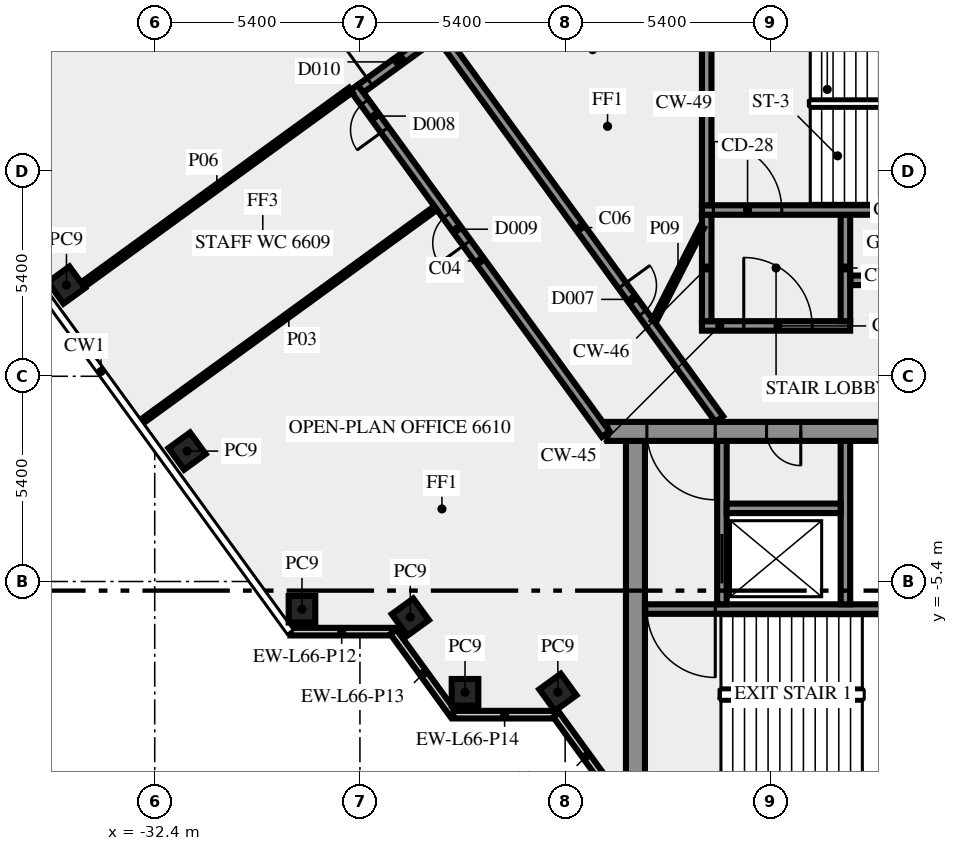
"""IFC4 building model, lengths in metres.
Left out: names, types, materials, properties, quantities, classifications, styles, units other than length and angle.
Written with IfcOpenShell. Run it as: python <this file> out.ifc"""

import sys

from ifc_helpers import new_model, si_unit, direction, frame, frame_2d, origin, origin_2d, place, context, subcontext, project, spatial, rectangle, extrude, element, fill, save


model = new_model("IFC4")
c1 = context("Model", 3, precision=1e-05, world=origin(), true_north=direction((0.0, 1.0)))
c2 = subcontext(c1, "Body", "Model", "MODEL_VIEW")
j1 = project(units=[si_unit("LENGTHUNIT", "METRE"), si_unit("PLANEANGLEUNIT", "RADIAN")], contexts=[c1])
p1 = place(None, origin())
s1 = spatial("IfcSite", under=j1, at=p1, CompositionType="ELEMENT")
p2 = place(p1, origin())
s2 = spatial("IfcBuilding", under=s1, at=p2, CompositionType="ELEMENT")
p3 = place(p2, frame((0.0, 0.0, 285.0)))
s3 = spatial("IfcBuildingStorey", under=s2, at=p3, CompositionType="ELEMENT", Elevation=285.0)
for number, where, z_axis, x_axis in (
    (1, (-34.722, 2.4, 0.0), (0.0, 0.0, 1.0), (0.588, -0.809, 0.0)),
    (2, (-31.548, -1.969, 0.0), (0.0, 0.0, 1.0), (0.588, -0.809, 0.0)),
    (3, (-28.525, -6.13, 0.0), (0.0, 0.0, 1.0), (1.0, 0.0, 0.0)),
    (4, (-25.674, -6.337, 0.0), (0.0, 0.0, 1.0), (0.588, -0.809, 0.0)),
    (5, (-24.235, -8.315, 0.0), (0.0, 0.0, 1.0), (1.0, 0.0, 0.0)),
    (6, (-21.792, -8.315, 0.0), (0.0, 0.0, 1.0), (0.588, -0.809, 0.0)),
):
    element("IfcColumn", number, at=place(p3, frame(where, z_axis=z_axis, x_axis=x_axis)), inside=s3, PredefinedType="COLUMN", context=c2, shape_type="SweptSolid", body=[
        extrude(rectangle(XDim=0.7, YDim=0.7, at=origin_2d()), origin(), (0.0, 0.0, 1.0), 3.65),
    ])
p4 = place(p3, frame((-28.83, -6.719, 0.0), z_axis=(0.0, 0.0, 1.0), x_axis=(1.0, 0.0, 0.0)))
e7 = element("IfcWall", 7, at=p4, inside=s3, PredefinedType="SOLIDWALL", context=c2, shape_type="SweptSolid", body=[
    extrude(rectangle(XDim=2.7, YDim=0.2, at=frame_2d((1.35, 0.0))), origin(), (0.0, 0.0, 1.0), 3.65),
])
p5 = place(p3, frame((-26.12, -6.724, 0.0), z_axis=(0.0, 0.0, 1.0), x_axis=(0.587720002413, -0.809064397168, 0.0)))
e8 = element("IfcWall", 8, at=p5, inside=s3, PredefinedType="SOLIDWALL", context=c2, shape_type="SweptSolid", body=[
    extrude(rectangle(XDim=2.7, YDim=0.2, at=frame_2d((1.35, 0.0))), origin(), (0.0, 0.0, 1.0), 3.65),
])
p6 = place(p3, frame((-24.543, -8.904, 0.0), z_axis=(0.0, 0.0, 1.0), x_axis=(1.0, 0.0, 0.0)))
e9 = element("IfcWall", 9, at=p6, inside=s3, PredefinedType="SOLIDWALL", context=c2, shape_type="SweptSolid", body=[
    extrude(rectangle(XDim=2.7, YDim=0.2, at=frame_2d((1.35, 0.0))), origin(), (0.0, 0.0, 1.0), 3.65),
])
p7 = place(p3, frame((-21.833, -8.909, 0.0), z_axis=(0.0, 0.0, 1.0), x_axis=(0.587766567315, -0.809030569476, 0.0)))
e10 = element("IfcWall", 10, at=p7, inside=s3, PredefinedType="SOLIDWALL", context=c2, shape_type="SweptSolid", body=[
    extrude(rectangle(XDim=2.688, YDim=0.2, at=frame_2d((1.344, 0.0))), origin(), (0.0, 0.0, 1.0), 3.65),
])
p8 = place(p3, frame((-19.75, -10.5, 0.0), z_axis=(0.0, 0.0, 1.0), x_axis=(0.0, 1.0, 0.0)))
e11 = element("IfcWall", 11, at=p8, inside=s3, PredefinedType="SHEAR", context=c2, shape_type="SweptSolid", body=[
    extrude(rectangle(XDim=8.8, YDim=0.5, at=frame_2d((4.4, 0.0))), origin(), (0.0, 0.0, 1.0), 3.65),
])
p9 = place(p3, frame((-11.45, -6.125, 0.0), z_axis=(0.0, 0.0, 1.0), x_axis=(-1.0, 0.0, 0.0)))
e12 = element("IfcWall", 12, at=p9, inside=s3, PredefinedType="SHEAR", context=c2, shape_type="SweptSolid", body=[
    extrude(rectangle(XDim=8.05, YDim=0.25, at=frame_2d((4.025, 0.0))), origin(), (0.0, 0.0, 1.0), 3.65),
])
p10 = place(p9, frame((6.2, 0.0, 0.0)))
e13 = element("IfcOpeningElement", 13, at=p10, cuts=e12, PredefinedType="OPENING", context=c2, shape_type="SweptSolid", body=[
    extrude(rectangle(XDim=1.8, YDim=2.1, at=frame_2d((0.9, 1.05))), frame((0.0, 0.135, 0.0), z_axis=(0.0, -1.0, 0.0), x_axis=(1.0, 0.0, 0.0)), (0.0, 0.0, 1.0), 0.27),
])
p11 = place(p3, frame((-17.475, -6.0, 0.0), z_axis=(0.0, 0.0, 1.0), x_axis=(0.0, 1.0, 0.0)))
e14 = element("IfcWall", 14, at=p11, inside=s3, PredefinedType="SHEAR", context=c2, shape_type="SweptSolid", body=[
    extrude(rectangle(XDim=4.3, YDim=0.25, at=frame_2d((2.15, 0.0))), origin(), (0.0, 0.0, 1.0), 3.65),
])
p12 = place(p11, frame((0.55, 0.0, 0.0)))
e15 = element("IfcOpeningElement", 15, at=p12, cuts=e14, PredefinedType="OPENING", context=c2, shape_type="SweptSolid", body=[
    extrude(rectangle(XDim=1.3, YDim=2.1, at=frame_2d((0.65, 1.05))), frame((0.0, 0.135, 0.0), z_axis=(0.0, -1.0, 0.0), x_axis=(1.0, 0.0, 0.0)), (0.0, 0.0, 1.0), 0.27),
])
p13 = place(p3, frame((-14.225, -6.0, 0.0), z_axis=(0.0, 0.0, 1.0), x_axis=(0.0, 1.0, 0.0)))
e16 = element("IfcWall", 16, at=p13, inside=s3, PredefinedType="SHEAR", context=c2, shape_type="SweptSolid", body=[
    extrude(rectangle(XDim=4.3, YDim=0.25, at=frame_2d((2.15, 0.0))), origin(), (0.0, 0.0, 1.0), 3.65),
])
p14 = place(p3, frame((-17.35, -3.475, 0.0), z_axis=(0.0, 0.0, 1.0), x_axis=(1.0, 0.0, 0.0)))
e17 = element("IfcWall", 17, at=p14, inside=s3, PredefinedType="SHEAR", context=c2, shape_type="SweptSolid", body=[
    extrude(rectangle(XDim=3.0, YDim=0.25, at=frame_2d((1.5, 0.0))), origin(), (0.0, 0.0, 1.0), 3.65),
])
p15 = place(p3, frame((20.49, -1.45, 0.0), z_axis=(0.0, 0.0, 1.0), x_axis=(-1.0, 0.0, 0.0)))
e18 = element("IfcWall", 18, at=p15, inside=s3, PredefinedType="SHEAR", context=c2, shape_type="SweptSolid", body=[
    extrude(rectangle(XDim=40.98, YDim=0.5, at=frame_2d((20.49, 0.0))), origin(), (0.0, 0.0, 1.0), 3.65),
])
p16 = place(p15, frame((38.14, 0.0, 0.0)))
e19 = element("IfcOpeningElement", 19, at=p16, cuts=e18, PredefinedType="OPENING", context=c2, shape_type="SweptSolid", body=[
    extrude(rectangle(XDim=1.8, YDim=2.1, at=frame_2d((0.9, 1.05))), frame((0.0, 0.26, 0.0), z_axis=(0.0, -1.0, 0.0), x_axis=(1.0, 0.0, 0.0)), (0.0, 0.0, 1.0), 0.52),
])
p17 = place(p15, frame((35.89, 0.0, 0.0)))
e20 = element("IfcOpeningElement", 20, at=p17, cuts=e18, PredefinedType="OPENING", context=c2, shape_type="SweptSolid", body=[
    extrude(rectangle(XDim=0.9, YDim=2.1, at=frame_2d((0.45, 1.05))), frame((0.0, 0.26, 0.0), z_axis=(0.0, -1.0, 0.0), x_axis=(1.0, 0.0, 0.0)), (0.0, 0.0, 1.0), 0.52),
])
p18 = place(p15, frame((32.94, 0.0, 0.0)))
e21 = element("IfcOpeningElement", 21, at=p18, cuts=e18, PredefinedType="OPENING", context=c2, shape_type="SweptSolid", body=[
    extrude(rectangle(XDim=0.9, YDim=2.1, at=frame_2d((0.45, 1.05))), frame((0.0, 0.26, 0.0), z_axis=(0.0, -1.0, 0.0), x_axis=(1.0, 0.0, 0.0)), (0.0, 0.0, 1.0), 0.52),
])
p19 = place(p15, frame((31.015, 0.0, 0.0)))
e22 = element("IfcOpeningElement", 22, at=p19, cuts=e18, PredefinedType="OPENING", context=c2, shape_type="SweptSolid", body=[
    extrude(rectangle(XDim=0.8, YDim=2.1, at=frame_2d((0.4, 1.05))), frame((0.0, 0.26, 0.0), z_axis=(0.0, -1.0, 0.0), x_axis=(1.0, 0.0, 0.0)), (0.0, 0.0, 1.0), 0.52),
])
p20 = place(p15, frame((24.765, 0.0, 0.0)))
e23 = element("IfcOpeningElement", 23, at=p20, cuts=e18, PredefinedType="OPENING", context=c2, shape_type="SweptSolid", body=[
    extrude(rectangle(XDim=0.8, YDim=2.1, at=frame_2d((0.4, 1.05))), frame((0.0, 0.26, 0.0), z_axis=(0.0, -1.0, 0.0), x_axis=(1.0, 0.0, 0.0)), (0.0, 0.0, 1.0), 0.52),
])
p21 = place(p15, frame((21.765, 0.0, 0.0)))
e24 = element("IfcOpeningElement", 24, at=p21, cuts=e18, PredefinedType="OPENING", context=c2, shape_type="SweptSolid", body=[
    extrude(rectangle(XDim=2.0, YDim=2.1, at=frame_2d((1.0, 1.05))), frame((0.0, 0.26, 0.0), z_axis=(0.0, -1.0, 0.0), x_axis=(1.0, 0.0, 0.0)), (0.0, 0.0, 1.0), 0.52),
])
p22 = place(p15, frame((15.202, 0.0, 0.0)))
e25 = element("IfcOpeningElement", 25, at=p22, cuts=e18, PredefinedType="OPENING", context=c2, shape_type="SweptSolid", body=[
    extrude(rectangle(XDim=0.9, YDim=2.1, at=frame_2d((0.45, 1.05))), frame((0.0, 0.26, 0.0), z_axis=(0.0, -1.0, 0.0), x_axis=(1.0, 0.0, 0.0)), (0.0, 0.0, 1.0), 0.52),
])
p23 = place(p15, frame((13.54, 0.0, 0.0)))
e26 = element("IfcOpeningElement", 26, at=p23, cuts=e18, PredefinedType="OPENING", context=c2, shape_type="SweptSolid", body=[
    extrude(rectangle(XDim=0.9, YDim=2.1, at=frame_2d((0.45, 1.05))), frame((0.0, 0.26, 0.0), z_axis=(0.0, -1.0, 0.0), x_axis=(1.0, 0.0, 0.0)), (0.0, 0.0, 1.0), 0.52),
])
p24 = place(p15, frame((11.64, 0.0, 0.0)))
e27 = element("IfcOpeningElement", 27, at=p24, cuts=e18, PredefinedType="OPENING", context=c2, shape_type="SweptSolid", body=[
    extrude(rectangle(XDim=0.9, YDim=2.1, at=frame_2d((0.45, 1.05))), frame((0.0, 0.26, 0.0), z_axis=(0.0, -1.0, 0.0), x_axis=(1.0, 0.0, 0.0)), (0.0, 0.0, 1.0), 0.52),
])
p25 = place(p15, frame((9.577, 0.0, 0.0)))
e28 = element("IfcOpeningElement", 28, at=p25, cuts=e18, PredefinedType="OPENING", context=c2, shape_type="SweptSolid", body=[
    extrude(rectangle(XDim=0.9, YDim=2.1, at=frame_2d((0.45, 1.05))), frame((0.0, 0.26, 0.0), z_axis=(0.0, -1.0, 0.0), x_axis=(1.0, 0.0, 0.0)), (0.0, 0.0, 1.0), 0.52),
])
p26 = place(p15, frame((7.14, 0.0, 0.0)))
e29 = element("IfcOpeningElement", 29, at=p26, cuts=e18, PredefinedType="OPENING", context=c2, shape_type="SweptSolid", body=[
    extrude(rectangle(XDim=0.9, YDim=2.1, at=frame_2d((0.45, 1.05))), frame((0.0, 0.26, 0.0), z_axis=(0.0, -1.0, 0.0), x_axis=(1.0, 0.0, 0.0)), (0.0, 0.0, 1.0), 0.52),
])
p27 = place(p15, frame((5.028, 0.0, 0.0)))
e30 = element("IfcOpeningElement", 30, at=p27, cuts=e18, PredefinedType="OPENING", context=c2, shape_type="SweptSolid", body=[
    extrude(rectangle(XDim=0.8, YDim=2.1, at=frame_2d((0.4, 1.05))), frame((0.0, 0.26, 0.0), z_axis=(0.0, -1.0, 0.0), x_axis=(1.0, 0.0, 0.0)), (0.0, 0.0, 1.0), 0.52),
])
p28 = place(p15, frame((3.452, 0.0, 0.0)))
e31 = element("IfcOpeningElement", 31, at=p28, cuts=e18, PredefinedType="OPENING", context=c2, shape_type="SweptSolid", body=[
    extrude(rectangle(XDim=0.8, YDim=2.1, at=frame_2d((0.4, 1.05))), frame((0.0, 0.26, 0.0), z_axis=(0.0, -1.0, 0.0), x_axis=(1.0, 0.0, 0.0)), (0.0, 0.0, 1.0), 0.52),
])
p29 = place(p15, frame((1.04, 0.0, 0.0)))
e32 = element("IfcOpeningElement", 32, at=p29, cuts=e18, PredefinedType="OPENING", context=c2, shape_type="SweptSolid", body=[
    extrude(rectangle(XDim=1.8, YDim=2.1, at=frame_2d((0.9, 1.05))), frame((0.0, 0.26, 0.0), z_axis=(0.0, -1.0, 0.0), x_axis=(1.0, 0.0, 0.0)), (0.0, 0.0, 1.0), 0.52),
])
p30 = place(p3, frame((-18.0, 1.325, 0.0), z_axis=(0.0, 0.0, 1.0), x_axis=(1.0, 0.0, 0.0)))
e33 = element("IfcWall", 33, at=p30, inside=s3, PredefinedType="SHEAR", context=c2, shape_type="SweptSolid", body=[
    extrude(rectangle(XDim=3.9, YDim=0.25, at=frame_2d((1.95, 0.0))), origin(), (0.0, 0.0, 1.0), 3.65),
])
p31 = place(p30, frame((1.1, 0.0, 0.0)))
e34 = element("IfcOpeningElement", 34, at=p31, cuts=e33, PredefinedType="OPENING", context=c2, shape_type="SweptSolid", body=[
    extrude(rectangle(XDim=1.8, YDim=2.1, at=frame_2d((0.9, 1.05))), frame((0.0, 0.135, 0.0), z_axis=(0.0, -1.0, 0.0), x_axis=(1.0, 0.0, 0.0)), (0.0, 0.0, 1.0), 0.27),
])
for number, where, z_axis, x_axis in (
    (35, (-17.875, 1.45, 0.0), (0.0, 0.0, 1.0), (0.0, 1.0, 0.0)),
    (36, (-14.225, 1.45, 0.0), (0.0, 0.0, 1.0), (0.0, 1.0, 0.0)),
):
    element("IfcWall", number, at=place(p3, frame(where, z_axis=z_axis, x_axis=x_axis)), inside=s3, PredefinedType="SHEAR", context=c2, shape_type="SweptSolid", body=[
        extrude(rectangle(XDim=2.8, YDim=0.25, at=frame_2d((1.4, 0.0))), origin(), (0.0, 0.0, 1.0), 3.65),
    ])
p32 = place(p3, frame((-18.0, 4.375, 0.0), z_axis=(0.0, 0.0, 1.0), x_axis=(1.0, 0.0, 0.0)))
e37 = element("IfcWall", 37, at=p32, inside=s3, PredefinedType="SHEAR", context=c2, shape_type="SweptSolid", body=[
    extrude(rectangle(XDim=10.5, YDim=0.25, at=frame_2d((5.25, 0.0))), origin(), (0.0, 0.0, 1.0), 3.65),
])
p33 = place(p32, frame((0.3, 0.0, 0.0)))
e38 = element("IfcOpeningElement", 38, at=p33, cuts=e37, PredefinedType="OPENING", context=c2, shape_type="SweptSolid", body=[
    extrude(rectangle(XDim=1.8, YDim=2.1, at=frame_2d((0.9, 1.05))), frame((0.0, 0.135, 0.0), z_axis=(0.0, -1.0, 0.0), x_axis=(1.0, 0.0, 0.0)), (0.0, 0.0, 1.0), 0.27),
])
p34 = place(p3, frame((-17.875, 4.5, 0.0), z_axis=(0.0, 0.0, 1.0), x_axis=(0.0, 1.0, 0.0)))
e39 = element("IfcWall", 39, at=p34, inside=s3, PredefinedType="SHEAR", context=c2, shape_type="SweptSolid", body=[
    extrude(rectangle(XDim=5.35, YDim=0.25, at=frame_2d((2.675, 0.0))), origin(), (0.0, 0.0, 1.0), 3.65),
])
p35 = place(p3, frame((-20.531, -1.523, 0.0), z_axis=(0.0, 0.0, 1.0), x_axis=(-0.587782646447, 0.809018887626, 0.0)))
e40 = element("IfcWall", 40, at=p35, inside=s3, PredefinedType="SOLIDWALL", context=c2, shape_type="SweptSolid", body=[
    extrude(rectangle(XDim=11.27, YDim=0.25, at=frame_2d((5.635, 0.0))), origin(), (0.0, 0.0, 1.0), 3.65),
])
p36 = place(p35, frame((6.216, 0.0, 0.0)))
e41 = element("IfcOpeningElement", 41, at=p36, cuts=e40, PredefinedType="OPENING", context=c2, shape_type="SweptSolid", body=[
    extrude(rectangle(XDim=0.9, YDim=2.1, at=frame_2d((0.45, 1.05))), frame((0.0, 0.135, 0.0), z_axis=(0.0, -1.0, 0.0), x_axis=(1.0, 0.0, 0.0)), (0.0, 0.0, 1.0), 0.27),
])
p37 = place(p35, frame((9.896, 0.0, 0.0)))
e42 = element("IfcOpeningElement", 42, at=p37, cuts=e40, PredefinedType="OPENING", context=c2, shape_type="SweptSolid", body=[
    extrude(rectangle(XDim=0.9, YDim=2.1, at=frame_2d((0.45, 1.05))), frame((0.0, 0.135, 0.0), z_axis=(0.0, -1.0, 0.0), x_axis=(1.0, 0.0, 0.0)), (0.0, 0.0, 1.0), 0.27),
])
p38 = place(p3, frame((-26.981, 7.567, 0.0), z_axis=(0.0, 0.0, 1.0), x_axis=(0.809038743598, 0.587755315891, 0.0)))
e43 = element("IfcWall", 43, at=p38, inside=s3, PredefinedType="SOLIDWALL", context=c2, shape_type="SweptSolid", body=[
    extrude(rectangle(XDim=2.65, YDim=0.25, at=frame_2d((1.325, 0.0))), origin(), (0.0, 0.0, 1.0), 3.65),
])
p39 = place(p38, frame((0.3, 0.0, 0.0)))
e44 = element("IfcOpeningElement", 44, at=p39, cuts=e43, PredefinedType="OPENING", context=c2, shape_type="SweptSolid", body=[
    extrude(rectangle(XDim=1.8, YDim=2.1, at=frame_2d((0.9, 1.05))), frame((0.0, 0.135, 0.0), z_axis=(0.0, -1.0, 0.0), x_axis=(1.0, 0.0, 0.0)), (0.0, 0.0, 1.0), 0.27),
])
p40 = place(p3, frame((-24.865, 8.95, 0.0), z_axis=(0.0, 0.0, 1.0), x_axis=(0.587791617212, -0.809012369952, 0.0)))
e45 = element("IfcWall", 45, at=p40, inside=s3, PredefinedType="SOLIDWALL", context=c2, shape_type="SweptSolid", body=[
    extrude(rectangle(XDim=12.453, YDim=0.25, at=frame_2d((6.227, 0.0))), origin(), (0.0, 0.0, 1.0), 3.65),
])
p41 = place(p40, frame((8.112, 0.0, 0.0)))
e46 = element("IfcOpeningElement", 46, at=p41, cuts=e45, PredefinedType="OPENING", context=c2, shape_type="SweptSolid", body=[
    extrude(rectangle(XDim=0.9, YDim=2.1, at=frame_2d((0.45, 1.05))), frame((0.0, 0.135, 0.0), z_axis=(0.0, -1.0, 0.0), x_axis=(1.0, 0.0, 0.0)), (0.0, 0.0, 1.0), 0.27),
])
p42 = place(p3, frame((-14.09, 2.525, 0.0), z_axis=(0.0, 0.0, 1.0), x_axis=(1.0, 0.0, 0.0)))
e47 = element("IfcWall", 47, at=p42, inside=s3, PredefinedType="SOLIDWALL", context=c2, shape_type="SweptSolid", body=[
    extrude(rectangle(XDim=8.84, YDim=0.25, at=frame_2d((4.42, 0.0))), origin(), (0.0, 0.0, 1.0), 3.65),
])
p43 = place(p42, frame((3.453, 0.0, 0.0)))
e48 = element("IfcOpeningElement", 48, at=p43, cuts=e47, PredefinedType="OPENING", context=c2, shape_type="SweptSolid", body=[
    extrude(rectangle(XDim=1.8, YDim=2.1, at=frame_2d((0.9, 1.05))), frame((0.0, 0.135, 0.0), z_axis=(0.0, -1.0, 0.0), x_axis=(1.0, 0.0, 0.0)), (0.0, 0.0, 1.0), 0.27),
])
p44 = place(p3, frame((-25.008, 4.427, 0.0), z_axis=(0.0, 0.0, 1.0), x_axis=(-0.808994684961, -0.587815957341, 0.0)))
e49 = element("IfcWall", 49, at=p44, inside=s3, PredefinedType="PARTITIONING", context=c2, shape_type="SweptSolid", body=[
    extrude(rectangle(XDim=9.55, YDim=0.12, at=frame_2d((4.775, 0.0))), origin(), (0.0, 0.0, 1.0), 2.95),
])
p45 = place(p3, frame((-34.291, 2.41, 0.0), z_axis=(0.0, 0.0, 1.0), x_axis=(0.809027940177, 0.587770186393, 0.0)))
e50 = element("IfcWall", 50, at=p45, inside=s3, PredefinedType="PARTITIONING", context=c2, shape_type="SweptSolid", body=[
    extrude(rectangle(XDim=8.715, YDim=0.15, at=frame_2d((4.357, 0.0))), origin(), (0.0, 0.0, 1.0), 3.65),
])
p46 = place(p3, frame((-19.261, 1.45, 0.0), z_axis=(0.0, 0.0, 1.0), x_axis=(0.453950796792, 0.891026752736, 0.0)))
e51 = element("IfcWall", 51, at=p46, inside=s3, PredefinedType="PARTITIONING", context=c2, shape_type="SweptSolid", body=[
    extrude(rectangle(XDim=2.778, YDim=0.12, at=frame_2d((1.389, 0.0))), origin(), (0.0, 0.0, 1.0), 3.65),
])
p47 = place(p10, origin())
e52 = element("IfcDoor", 52, at=p47, inside=s3, OperationType="DOUBLE_DOOR_SINGLE_SWING", PredefinedType="DOOR", context=c2, shape_type="SweptSolid", body=[
    extrude(rectangle(XDim=1.8, YDim=2.1, at=frame_2d((0.9, 1.05))), frame((0.0, 0.025, 0.0), z_axis=(0.0, -1.0, 0.0), x_axis=(1.0, 0.0, 0.0)), (0.0, 0.0, 1.0), 0.05),
])
fill(e13, e52)
p48 = place(p12, origin())
e53 = element("IfcDoor", 53, at=p48, inside=s3, OperationType="DOUBLE_DOOR_SLIDING", PredefinedType="DOOR", context=c2, shape_type="SweptSolid", body=[
    extrude(rectangle(XDim=1.3, YDim=2.1, at=frame_2d((0.65, 1.05))), frame((0.0, 0.025, 0.0), z_axis=(0.0, -1.0, 0.0), x_axis=(1.0, 0.0, 0.0)), (0.0, 0.0, 1.0), 0.05),
])
fill(e15, e53)
p49 = place(p16, origin())
e54 = element("IfcDoor", 54, at=p49, inside=s3, OperationType="DOUBLE_DOOR_SINGLE_SWING", PredefinedType="DOOR", context=c2, shape_type="SweptSolid", body=[
    extrude(rectangle(XDim=1.8, YDim=2.1, at=frame_2d((0.9, 1.05))), frame((0.0, 0.025, 0.0), z_axis=(0.0, -1.0, 0.0), x_axis=(1.0, 0.0, 0.0)), (0.0, 0.0, 1.0), 0.05),
])
fill(e19, e54)
p50 = place(p17, origin())
e55 = element("IfcDoor", 55, at=p50, inside=s3, OperationType="SINGLE_SWING_RIGHT", PredefinedType="DOOR", context=c2, shape_type="SweptSolid", body=[
    extrude(rectangle(XDim=0.9, YDim=2.1, at=frame_2d((0.45, 1.05))), frame((0.0, 0.025, 0.0), z_axis=(0.0, -1.0, 0.0), x_axis=(1.0, 0.0, 0.0)), (0.0, 0.0, 1.0), 0.05),
])
fill(e20, e55)
p51 = place(p31, origin())
e56 = element("IfcDoor", 56, at=p51, inside=s3, OperationType="DOUBLE_DOOR_SINGLE_SWING", PredefinedType="DOOR", context=c2, shape_type="SweptSolid", body=[
    extrude(rectangle(XDim=1.8, YDim=2.1, at=frame_2d((0.9, 1.05))), frame((0.0, 0.025, 0.0), z_axis=(0.0, -1.0, 0.0), x_axis=(1.0, 0.0, 0.0)), (0.0, 0.0, 1.0), 0.05),
])
fill(e34, e56)
p52 = place(p33, origin())
e57 = element("IfcDoor", 57, at=p52, inside=s3, OperationType="DOUBLE_DOOR_SINGLE_SWING", PredefinedType="DOOR", context=c2, shape_type="SweptSolid", body=[
    extrude(rectangle(XDim=1.8, YDim=2.1, at=frame_2d((0.9, 1.05))), frame((0.0, 0.025, 0.0), z_axis=(0.0, -1.0, 0.0), x_axis=(1.0, 0.0, 0.0)), (0.0, 0.0, 1.0), 0.05),
])
fill(e38, e57)
p53 = place(p41, origin())
e58 = element("IfcDoor", 58, at=p53, inside=s3, OperationType="SINGLE_SWING_RIGHT", PredefinedType="DOOR", context=c2, shape_type="SweptSolid", body=[
    extrude(rectangle(XDim=0.9, YDim=2.1, at=frame_2d((0.45, 1.05))), frame((0.0, 0.025, 0.0), z_axis=(0.0, -1.0, 0.0), x_axis=(1.0, 0.0, 0.0)), (0.0, 0.0, 1.0), 0.05),
])
fill(e46, e58)
p54 = place(p36, origin())
e59 = element("IfcDoor", 59, at=p54, inside=s3, OperationType="SINGLE_SWING_RIGHT", PredefinedType="DOOR", context=c2, shape_type="SweptSolid", body=[
    extrude(rectangle(XDim=0.9, YDim=2.1, at=frame_2d((0.45, 1.05))), frame((0.0, 0.025, 0.0), z_axis=(0.0, -1.0, 0.0), x_axis=(1.0, 0.0, 0.0)), (0.0, 0.0, 1.0), 0.05),
])
fill(e41, e59)
p55 = place(p39, origin())
e60 = element("IfcDoor", 60, at=p55, inside=s3, OperationType="DOUBLE_DOOR_SINGLE_SWING", PredefinedType="DOOR", context=c2, shape_type="SweptSolid", body=[
    extrude(rectangle(XDim=1.8, YDim=2.1, at=frame_2d((0.9, 1.05))), frame((0.0, 0.025, 0.0), z_axis=(0.0, -1.0, 0.0), x_axis=(1.0, 0.0, 0.0)), (0.0, 0.0, 1.0), 0.05),
])
fill(e44, e60)
p56 = place(p37, origin())
e61 = element("IfcDoor", 61, at=p56, inside=s3, OperationType="SINGLE_SWING_RIGHT", PredefinedType="DOOR", context=c2, shape_type="SweptSolid", body=[
    extrude(rectangle(XDim=0.9, YDim=2.1, at=frame_2d((0.45, 1.05))), frame((0.0, 0.025, 0.0), z_axis=(0.0, -1.0, 0.0), x_axis=(1.0, 0.0, 0.0)), (0.0, 0.0, 1.0), 0.05),
])
fill(e42, e61)
save(model, sys.argv[1])
